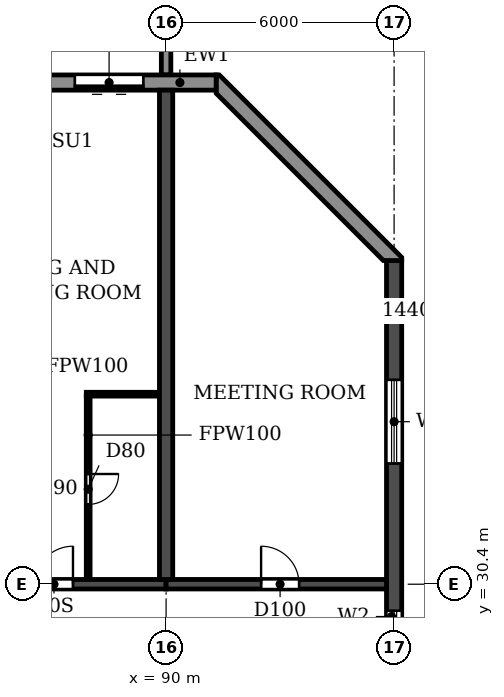
"""IFC4 building model, lengths in metres.
Left out: names, types, materials, properties, quantities, classifications, styles, units other than length and angle.
Written with IfcOpenShell. Run it as: python <this file> out.ifc"""

import sys

from ifc_helpers import new_model, si_unit, direction, frame, frame_2d, origin, place, context, subcontext, project, spatial, polyline, rectangle, outline, extrude, source, transform, mapped, element, fill, save


model = new_model("IFC4")
c1 = context("Model", 3, precision=1e-05, world=origin(), true_north=direction((0.0, 1.0)))
c2 = subcontext(c1, "Body", "Model", "MODEL_VIEW")
j1 = project(units=[si_unit("LENGTHUNIT", "METRE"), si_unit("PLANEANGLEUNIT", "RADIAN")], contexts=[c1])
p1 = place(None, origin())
s1 = spatial("IfcSite", under=j1, at=p1, CompositionType="ELEMENT")
p2 = place(p1, origin())
s2 = spatial("IfcBuilding", under=s1, at=p2, CompositionType="ELEMENT")
p3 = place(p2, frame((0.0, 0.0, 102.6)))
s3 = spatial("IfcBuildingStorey", under=s2, at=p3, CompositionType="ELEMENT", Elevation=102.6)
p4 = place(p3, frame((90.0, 30.525, 0.0), z_axis=(0.0, 0.0, 1.0), x_axis=(0.0, 1.0, 0.0)))
e1 = element("IfcWall", 1, at=p4, inside=s3, PredefinedType="SHEAR", context=c2, shape_type="SweptSolid", body=[
    extrude(rectangle(XDim=12.875, YDim=0.35, at=frame_2d((6.438, 0.0))), origin(), (0.0, 0.0, 1.0), 3.0),
])
p5 = place(p3, frame((96.0, 4.683, 0.0), z_axis=(0.0, 0.0, 1.0), x_axis=(0.0, 1.0, 0.0)))
e2 = element("IfcWall", 2, at=p5, inside=s3, PredefinedType="SHEAR", context=c2, shape_type="SweptSolid", body=[
    extrude(rectangle(XDim=34.234, YDim=0.4, at=frame_2d((17.117, 0.0))), origin(), (0.0, 0.0, 1.0), 3.0),
])
p6 = place(p5, frame((15.917, 0.0, 0.9)))
e3 = element("IfcOpeningElement", 3, at=p6, cuts=e2, PredefinedType="OPENING", context=c2, shape_type="SweptSolid", body=[
    extrude(rectangle(XDim=1.2, YDim=1.5, at=frame_2d((0.6, 0.75))), frame((0.0, 0.21, 0.0), z_axis=(0.0, -1.0, 0.0), x_axis=(1.0, 0.0, 0.0)), (0.0, 0.0, 1.0), 0.42),
])
p7 = place(p5, frame((23.817, 0.0, 0.9)))
e4 = element("IfcOpeningElement", 4, at=p7, cuts=e2, PredefinedType="OPENING", context=c2, shape_type="SweptSolid", body=[
    extrude(rectangle(XDim=1.2, YDim=1.5, at=frame_2d((0.6, 0.75))), frame((0.0, 0.21, 0.0), z_axis=(0.0, -1.0, 0.0), x_axis=(1.0, 0.0, 0.0)), (0.0, 0.0, 1.0), 0.42),
])
p8 = place(p5, frame((8.017, 0.0, 0.9)))
e5 = element("IfcOpeningElement", 5, at=p8, cuts=e2, PredefinedType="OPENING", context=c2, shape_type="SweptSolid", body=[
    extrude(rectangle(XDim=1.2, YDim=1.5, at=frame_2d((0.6, 0.75))), frame((0.0, 0.21, 0.0), z_axis=(0.0, -1.0, 0.0), x_axis=(1.0, 0.0, 0.0)), (0.0, 0.0, 1.0), 0.42),
])
p9 = place(p5, frame((28.894, 0.0, 0.6)))
e6 = element("IfcOpeningElement", 6, at=p9, cuts=e2, PredefinedType="OPENING", context=c2, shape_type="SweptSolid", body=[
    extrude(rectangle(XDim=2.2, YDim=1.8, at=frame_2d((1.1, 0.9))), frame((0.0, 0.21, 0.0), z_axis=(0.0, -1.0, 0.0), x_axis=(1.0, 0.0, 0.0)), (0.0, 0.0, 1.0), 0.42),
])
p10 = place(p5, frame((2.541, 0.0, 0.6)))
e7 = element("IfcOpeningElement", 7, at=p10, cuts=e2, PredefinedType="OPENING", context=c2, shape_type="SweptSolid", body=[
    extrude(rectangle(XDim=2.2, YDim=1.8, at=frame_2d((1.1, 0.9))), frame((0.0, 0.21, 0.0), z_axis=(0.0, -1.0, 0.0), x_axis=(1.0, 0.0, 0.0)), (0.0, 0.0, 1.0), 0.42),
])
p11 = place(p3, frame((84.0, 30.4, 0.0), z_axis=(0.0, 0.0, 1.0), x_axis=(1.0, 0.0, 0.0)))
e8 = element("IfcWall", 8, at=p11, inside=s3, PredefinedType="SHEAR", context=c2, shape_type="SweptSolid", body=[
    extrude(rectangle(XDim=6.0, YDim=0.25, at=frame_2d((3.0, 0.0))), origin(), (0.0, 0.0, 1.0), 2.4),
])
p12 = place(p11, frame((2.55, 0.0, 0.0)))
e9 = element("IfcOpeningElement", 9, at=p12, cuts=e8, PredefinedType="OPENING", context=c2, shape_type="SweptSolid", body=[
    extrude(rectangle(XDim=1.0, YDim=2.1, at=frame_2d((0.5, 1.05))), frame((0.0, 0.135, 0.0), z_axis=(0.0, -1.0, 0.0), x_axis=(1.0, 0.0, 0.0)), (0.0, 0.0, 1.0), 0.27),
])
p13 = place(p3, frame((90.0, 30.4, 0.0), z_axis=(0.0, 0.0, 1.0), x_axis=(1.0, 0.0, 0.0)))
e10 = element("IfcWall", 10, at=p13, inside=s3, PredefinedType="SHEAR", context=c2, shape_type="SweptSolid", body=[
    extrude(rectangle(XDim=5.8, YDim=0.25, at=frame_2d((2.9, 0.0))), origin(), (0.0, 0.0, 1.0), 2.4),
])
p14 = place(p13, frame((2.5, 0.0, 0.0)))
e11 = element("IfcOpeningElement", 11, at=p14, cuts=e10, PredefinedType="OPENING", context=c2, shape_type="SweptSolid", body=[
    extrude(rectangle(XDim=1.0, YDim=2.1, at=frame_2d((0.5, 1.05))), frame((0.0, 0.135, 0.0), z_axis=(0.0, -1.0, 0.0), x_axis=(1.0, 0.0, 0.0)), (0.0, 0.0, 1.0), 0.27),
])
p15 = place(p3, origin())
e12 = element("IfcWall", 12, at=p15, inside=s3, PredefinedType="STANDARD", context=c2, shape_type="SweptSolid", body=[
    extrude(outline(polyline([(96.2, 38.917), (96.2, 39.0), (91.4, 43.8), (91.317, 43.8), (91.317, 43.317), (95.717, 38.917), (96.2, 38.917)])), origin(), (0.0, 0.0, 1.0), 3.0),
])
p16 = place(p3, frame((91.317, 43.6, 0.0), z_axis=(0.0, 0.0, 1.0), x_axis=(-1.0, 0.0, 0.0)))
e13 = element("IfcWall", 13, at=p16, inside=s3, PredefinedType="STANDARD", context=c2, shape_type="SweptSolid", body=[
    extrude(rectangle(XDim=80.634, YDim=0.4, at=frame_2d((40.317, 0.0))), origin(), (0.0, 0.0, 1.0), 3.0),
])
p17 = place(p16, frame((76.717, 0.0, 0.9)))
e14 = element("IfcOpeningElement", 14, at=p17, cuts=e13, PredefinedType="OPENING", context=c2, shape_type="SweptSolid", body=[
    extrude(rectangle(XDim=2.2, YDim=1.5, at=frame_2d((1.1, 0.75))), frame((0.0, 0.21, 0.0), z_axis=(0.0, -1.0, 0.0), x_axis=(1.0, 0.0, 0.0)), (0.0, 0.0, 1.0), 0.42),
])
p18 = place(p16, frame((73.917, 0.0, 0.0)))
e15 = element("IfcOpeningElement", 15, at=p18, cuts=e13, PredefinedType="OPENING", context=c2, shape_type="SweptSolid", body=[
    extrude(rectangle(XDim=1.8, YDim=2.4, at=frame_2d((0.9, 1.2))), frame((0.0, 0.21, 0.0), z_axis=(0.0, -1.0, 0.0), x_axis=(1.0, 0.0, 0.0)), (0.0, 0.0, 1.0), 0.42),
])
p19 = place(p16, frame((70.717, 0.0, 0.9)))
e16 = element("IfcOpeningElement", 16, at=p19, cuts=e13, PredefinedType="OPENING", context=c2, shape_type="SweptSolid", body=[
    extrude(rectangle(XDim=2.2, YDim=1.5, at=frame_2d((1.1, 0.75))), frame((0.0, 0.21, 0.0), z_axis=(0.0, -1.0, 0.0), x_axis=(1.0, 0.0, 0.0)), (0.0, 0.0, 1.0), 0.42),
])
p20 = place(p16, frame((67.717, 0.0, 0.9)))
e17 = element("IfcOpeningElement", 17, at=p20, cuts=e13, PredefinedType="OPENING", context=c2, shape_type="SweptSolid", body=[
    extrude(rectangle(XDim=2.2, YDim=1.5, at=frame_2d((1.1, 0.75))), frame((0.0, 0.21, 0.0), z_axis=(0.0, -1.0, 0.0), x_axis=(1.0, 0.0, 0.0)), (0.0, 0.0, 1.0), 0.42),
])
p21 = place(p16, frame((64.917, 0.0, 0.0)))
e18 = element("IfcOpeningElement", 18, at=p21, cuts=e13, PredefinedType="OPENING", context=c2, shape_type="SweptSolid", body=[
    extrude(rectangle(XDim=1.8, YDim=2.4, at=frame_2d((0.9, 1.2))), frame((0.0, 0.21, 0.0), z_axis=(0.0, -1.0, 0.0), x_axis=(1.0, 0.0, 0.0)), (0.0, 0.0, 1.0), 0.42),
])
p22 = place(p16, frame((61.717, 0.0, 0.9)))
e19 = element("IfcOpeningElement", 19, at=p22, cuts=e13, PredefinedType="OPENING", context=c2, shape_type="SweptSolid", body=[
    extrude(rectangle(XDim=2.2, YDim=1.5, at=frame_2d((1.1, 0.75))), frame((0.0, 0.21, 0.0), z_axis=(0.0, -1.0, 0.0), x_axis=(1.0, 0.0, 0.0)), (0.0, 0.0, 1.0), 0.42),
])
p23 = place(p16, frame((58.717, 0.0, 0.9)))
e20 = element("IfcOpeningElement", 20, at=p23, cuts=e13, PredefinedType="OPENING", context=c2, shape_type="SweptSolid", body=[
    extrude(rectangle(XDim=2.2, YDim=1.5, at=frame_2d((1.1, 0.75))), frame((0.0, 0.21, 0.0), z_axis=(0.0, -1.0, 0.0), x_axis=(1.0, 0.0, 0.0)), (0.0, 0.0, 1.0), 0.42),
])
p24 = place(p16, frame((55.717, 0.0, 0.9)))
e21 = element("IfcOpeningElement", 21, at=p24, cuts=e13, PredefinedType="OPENING", context=c2, shape_type="SweptSolid", body=[
    extrude(rectangle(XDim=2.2, YDim=1.5, at=frame_2d((1.1, 0.75))), frame((0.0, 0.21, 0.0), z_axis=(0.0, -1.0, 0.0), x_axis=(1.0, 0.0, 0.0)), (0.0, 0.0, 1.0), 0.42),
])
p25 = place(p16, frame((52.717, 0.0, 0.9)))
e22 = element("IfcOpeningElement", 22, at=p25, cuts=e13, PredefinedType="OPENING", context=c2, shape_type="SweptSolid", body=[
    extrude(rectangle(XDim=2.2, YDim=1.5, at=frame_2d((1.1, 0.75))), frame((0.0, 0.21, 0.0), z_axis=(0.0, -1.0, 0.0), x_axis=(1.0, 0.0, 0.0)), (0.0, 0.0, 1.0), 0.42),
])
p26 = place(p16, frame((49.917, 0.0, 0.0)))
e23 = element("IfcOpeningElement", 23, at=p26, cuts=e13, PredefinedType="OPENING", context=c2, shape_type="SweptSolid", body=[
    extrude(rectangle(XDim=1.8, YDim=2.4, at=frame_2d((0.9, 1.2))), frame((0.0, 0.21, 0.0), z_axis=(0.0, -1.0, 0.0), x_axis=(1.0, 0.0, 0.0)), (0.0, 0.0, 1.0), 0.42),
])
p27 = place(p16, frame((46.717, 0.0, 0.9)))
e24 = element("IfcOpeningElement", 24, at=p27, cuts=e13, PredefinedType="OPENING", context=c2, shape_type="SweptSolid", body=[
    extrude(rectangle(XDim=2.2, YDim=1.5, at=frame_2d((1.1, 0.75))), frame((0.0, 0.21, 0.0), z_axis=(0.0, -1.0, 0.0), x_axis=(1.0, 0.0, 0.0)), (0.0, 0.0, 1.0), 0.42),
])
p28 = place(p16, frame((43.917, 0.0, 0.0)))
e25 = element("IfcOpeningElement", 25, at=p28, cuts=e13, PredefinedType="OPENING", context=c2, shape_type="SweptSolid", body=[
    extrude(rectangle(XDim=1.8, YDim=2.4, at=frame_2d((0.9, 1.2))), frame((0.0, 0.21, 0.0), z_axis=(0.0, -1.0, 0.0), x_axis=(1.0, 0.0, 0.0)), (0.0, 0.0, 1.0), 0.42),
])
p29 = place(p16, frame((40.717, 0.0, 0.9)))
e26 = element("IfcOpeningElement", 26, at=p29, cuts=e13, PredefinedType="OPENING", context=c2, shape_type="SweptSolid", body=[
    extrude(rectangle(XDim=2.2, YDim=1.5, at=frame_2d((1.1, 0.75))), frame((0.0, 0.21, 0.0), z_axis=(0.0, -1.0, 0.0), x_axis=(1.0, 0.0, 0.0)), (0.0, 0.0, 1.0), 0.42),
])
p30 = place(p16, frame((37.717, 0.0, 0.9)))
e27 = element("IfcOpeningElement", 27, at=p30, cuts=e13, PredefinedType="OPENING", context=c2, shape_type="SweptSolid", body=[
    extrude(rectangle(XDim=2.2, YDim=1.5, at=frame_2d((1.1, 0.75))), frame((0.0, 0.21, 0.0), z_axis=(0.0, -1.0, 0.0), x_axis=(1.0, 0.0, 0.0)), (0.0, 0.0, 1.0), 0.42),
])
p31 = place(p16, frame((34.917, 0.0, 0.0)))
e28 = element("IfcOpeningElement", 28, at=p31, cuts=e13, PredefinedType="OPENING", context=c2, shape_type="SweptSolid", body=[
    extrude(rectangle(XDim=1.8, YDim=2.4, at=frame_2d((0.9, 1.2))), frame((0.0, 0.21, 0.0), z_axis=(0.0, -1.0, 0.0), x_axis=(1.0, 0.0, 0.0)), (0.0, 0.0, 1.0), 0.42),
])
p32 = place(p16, frame((31.717, 0.0, 0.9)))
e29 = element("IfcOpeningElement", 29, at=p32, cuts=e13, PredefinedType="OPENING", context=c2, shape_type="SweptSolid", body=[
    extrude(rectangle(XDim=2.2, YDim=1.5, at=frame_2d((1.1, 0.75))), frame((0.0, 0.21, 0.0), z_axis=(0.0, -1.0, 0.0), x_axis=(1.0, 0.0, 0.0)), (0.0, 0.0, 1.0), 0.42),
])
p33 = place(p16, frame((28.717, 0.0, 0.9)))
e30 = element("IfcOpeningElement", 30, at=p33, cuts=e13, PredefinedType="OPENING", context=c2, shape_type="SweptSolid", body=[
    extrude(rectangle(XDim=2.2, YDim=1.5, at=frame_2d((1.1, 0.75))), frame((0.0, 0.21, 0.0), z_axis=(0.0, -1.0, 0.0), x_axis=(1.0, 0.0, 0.0)), (0.0, 0.0, 1.0), 0.42),
])
p34 = place(p16, frame((25.917, 0.0, 0.0)))
e31 = element("IfcOpeningElement", 31, at=p34, cuts=e13, PredefinedType="OPENING", context=c2, shape_type="SweptSolid", body=[
    extrude(rectangle(XDim=1.8, YDim=2.4, at=frame_2d((0.9, 1.2))), frame((0.0, 0.21, 0.0), z_axis=(0.0, -1.0, 0.0), x_axis=(1.0, 0.0, 0.0)), (0.0, 0.0, 1.0), 0.42),
])
p35 = place(p16, frame((22.717, 0.0, 0.9)))
e32 = element("IfcOpeningElement", 32, at=p35, cuts=e13, PredefinedType="OPENING", context=c2, shape_type="SweptSolid", body=[
    extrude(rectangle(XDim=2.2, YDim=1.5, at=frame_2d((1.1, 0.75))), frame((0.0, 0.21, 0.0), z_axis=(0.0, -1.0, 0.0), x_axis=(1.0, 0.0, 0.0)), (0.0, 0.0, 1.0), 0.42),
])
p36 = place(p16, frame((19.717, 0.0, 0.9)))
e33 = element("IfcOpeningElement", 33, at=p36, cuts=e13, PredefinedType="OPENING", context=c2, shape_type="SweptSolid", body=[
    extrude(rectangle(XDim=2.2, YDim=1.5, at=frame_2d((1.1, 0.75))), frame((0.0, 0.21, 0.0), z_axis=(0.0, -1.0, 0.0), x_axis=(1.0, 0.0, 0.0)), (0.0, 0.0, 1.0), 0.42),
])
p37 = place(p16, frame((16.917, 0.0, 0.0)))
e34 = element("IfcOpeningElement", 34, at=p37, cuts=e13, PredefinedType="OPENING", context=c2, shape_type="SweptSolid", body=[
    extrude(rectangle(XDim=1.8, YDim=2.4, at=frame_2d((0.9, 1.2))), frame((0.0, 0.21, 0.0), z_axis=(0.0, -1.0, 0.0), x_axis=(1.0, 0.0, 0.0)), (0.0, 0.0, 1.0), 0.42),
])
p38 = place(p16, frame((13.717, 0.0, 0.9)))
e35 = element("IfcOpeningElement", 35, at=p38, cuts=e13, PredefinedType="OPENING", context=c2, shape_type="SweptSolid", body=[
    extrude(rectangle(XDim=2.2, YDim=1.5, at=frame_2d((1.1, 0.75))), frame((0.0, 0.21, 0.0), z_axis=(0.0, -1.0, 0.0), x_axis=(1.0, 0.0, 0.0)), (0.0, 0.0, 1.0), 0.42),
])
p39 = place(p16, frame((10.917, 0.0, 0.0)))
e36 = element("IfcOpeningElement", 36, at=p39, cuts=e13, PredefinedType="OPENING", context=c2, shape_type="SweptSolid", body=[
    extrude(rectangle(XDim=1.8, YDim=2.4, at=frame_2d((0.9, 1.2))), frame((0.0, 0.21, 0.0), z_axis=(0.0, -1.0, 0.0), x_axis=(1.0, 0.0, 0.0)), (0.0, 0.0, 1.0), 0.42),
])
p40 = place(p16, frame((7.717, 0.0, 0.9)))
e37 = element("IfcOpeningElement", 37, at=p40, cuts=e13, PredefinedType="OPENING", context=c2, shape_type="SweptSolid", body=[
    extrude(rectangle(XDim=2.2, YDim=1.5, at=frame_2d((1.1, 0.75))), frame((0.0, 0.21, 0.0), z_axis=(0.0, -1.0, 0.0), x_axis=(1.0, 0.0, 0.0)), (0.0, 0.0, 1.0), 0.42),
])
p41 = place(p16, frame((4.717, 0.0, 0.9)))
e38 = element("IfcOpeningElement", 38, at=p41, cuts=e13, PredefinedType="OPENING", context=c2, shape_type="SweptSolid", body=[
    extrude(rectangle(XDim=2.2, YDim=1.5, at=frame_2d((1.1, 0.75))), frame((0.0, 0.21, 0.0), z_axis=(0.0, -1.0, 0.0), x_axis=(1.0, 0.0, 0.0)), (0.0, 0.0, 1.0), 0.42),
])
p42 = place(p16, frame((1.917, 0.0, 0.0)))
e39 = element("IfcOpeningElement", 39, at=p42, cuts=e13, PredefinedType="OPENING", context=c2, shape_type="SweptSolid", body=[
    extrude(rectangle(XDim=1.8, YDim=2.4, at=frame_2d((0.9, 1.2))), frame((0.0, 0.21, 0.0), z_axis=(0.0, -1.0, 0.0), x_axis=(1.0, 0.0, 0.0)), (0.0, 0.0, 1.0), 0.42),
])
m1 = source(origin(), c2, "Body", "SweptSolid", [
    extrude(outline(polyline([(0.0, 0.0), (0.25, 0.0), (0.25, 3.1), (0.0, 3.1), (0.0, 0.0)])), origin(), (0.0, 0.0, 1.0), 3.1),
])
p43 = place(p3, frame((89.875, 43.8, 0.0)))
e40 = element("IfcWall", 40, at=p43, inside=s3, PredefinedType="STANDARD", context=c2, shape_type="MappedRepresentation", body=[
    mapped(m1, transform((0.0, 0.0, 0.0))),
])
p44 = place(p3, frame((87.9, 35.4, 0.0), z_axis=(0.0, 0.0, 1.0), x_axis=(1.0, 0.0, 0.0)))
e41 = element("IfcWall", 41, at=p44, inside=s3, PredefinedType="PARTITIONING", context=c2, shape_type="SweptSolid", body=[
    extrude(rectangle(XDim=1.915, YDim=0.1, at=frame_2d((0.958, 0.0))), origin(), (0.0, 0.0, 1.0), 3.0),
])
p45 = place(p3, frame((87.95, 30.535, 0.0), z_axis=(0.0, 0.0, 1.0), x_axis=(0.0, 1.0, 0.0)))
e42 = element("IfcWall", 42, at=p45, inside=s3, PredefinedType="PARTITIONING", context=c2, shape_type="SweptSolid", body=[
    extrude(rectangle(XDim=4.815, YDim=0.1, at=frame_2d((2.408, 0.0))), origin(), (0.0, 0.0, 1.0), 3.0),
])
p46 = place(p45, frame((1.965, 0.0, 0.0)))
e43 = element("IfcOpeningElement", 43, at=p46, cuts=e42, PredefinedType="OPENING", context=c2, shape_type="SweptSolid", body=[
    extrude(rectangle(XDim=0.8, YDim=2.1, at=frame_2d((0.4, 1.05))), frame((0.0, 0.06, 0.0), z_axis=(0.0, -1.0, 0.0), x_axis=(1.0, 0.0, 0.0)), (0.0, 0.0, 1.0), 0.12),
])
p47 = place(p7, origin())
e44 = element("IfcWindow", 44, at=p47, inside=s3, PartitioningType="SINGLE_PANEL", PredefinedType="WINDOW", context=c2, shape_type="SweptSolid", body=[
    extrude(rectangle(XDim=1.2, YDim=1.5, at=frame_2d((0.6, 0.75))), frame((0.0, 0.03, 0.0), z_axis=(0.0, -1.0, 0.0), x_axis=(1.0, 0.0, 0.0)), (0.0, 0.0, 1.0), 0.06),
])
fill(e4, e44)
p48 = place(p9, origin())
e45 = element("IfcWindow", 45, at=p48, inside=s3, PartitioningType="DOUBLE_PANEL_HORIZONTAL", PredefinedType="WINDOW", context=c2, shape_type="SweptSolid", body=[
    extrude(rectangle(XDim=2.2, YDim=1.8, at=frame_2d((1.1, 0.9))), frame((0.0, 0.03, 0.0), z_axis=(0.0, -1.0, 0.0), x_axis=(1.0, 0.0, 0.0)), (0.0, 0.0, 1.0), 0.06),
])
fill(e6, e45)
p49 = place(p42, origin())
e46 = element("IfcDoor", 46, at=p49, inside=s3, OperationType="DOUBLE_DOOR_SLIDING", PredefinedType="DOOR", context=c2, shape_type="SweptSolid", body=[
    extrude(rectangle(XDim=1.8, YDim=2.4, at=frame_2d((0.9, 1.2))), frame((0.0, 0.025, 0.0), z_axis=(0.0, -1.0, 0.0), x_axis=(1.0, 0.0, 0.0)), (0.0, 0.0, 1.0), 0.05),
])
fill(e39, e46)
p50 = place(p12, origin())
e47 = element("IfcDoor", 47, at=p50, inside=s3, OperationType="SINGLE_SWING_RIGHT", PredefinedType="DOOR", context=c2, shape_type="SweptSolid", body=[
    extrude(rectangle(XDim=1.0, YDim=2.1, at=frame_2d((0.5, 1.05))), frame((0.0, 0.025, 0.0), z_axis=(0.0, -1.0, 0.0), x_axis=(1.0, 0.0, 0.0)), (0.0, 0.0, 1.0), 0.05),
])
fill(e9, e47)
p51 = place(p46, frame((0.8, 0.0, 0.0), z_axis=(0.0, 0.0, 1.0), x_axis=(-1.0, 0.0, 0.0)))
e48 = element("IfcDoor", 48, at=p51, inside=s3, OperationType="SINGLE_SWING_LEFT", PredefinedType="DOOR", context=c2, shape_type="SweptSolid", body=[
    extrude(rectangle(XDim=0.8, YDim=2.1, at=frame_2d((0.4, 1.05))), frame((0.0, 0.025, 0.0), z_axis=(0.0, -1.0, 0.0), x_axis=(1.0, 0.0, 0.0)), (0.0, 0.0, 1.0), 0.05),
])
fill(e43, e48)
p52 = place(p14, origin())
e49 = element("IfcDoor", 49, at=p52, inside=s3, OperationType="SINGLE_SWING_LEFT", PredefinedType="DOOR", context=c2, shape_type="SweptSolid", body=[
    extrude(rectangle(XDim=1.0, YDim=2.1, at=frame_2d((0.5, 1.05))), frame((0.0, 0.025, 0.0), z_axis=(0.0, -1.0, 0.0), x_axis=(1.0, 0.0, 0.0)), (0.0, 0.0, 1.0), 0.05),
])
fill(e11, e49)
save(model, sys.argv[1])
